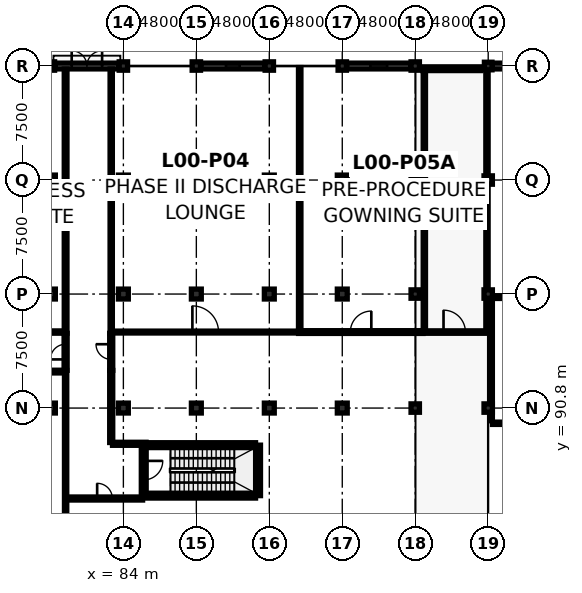
"""IFC4 building model, lengths in metres.
Left out: names, types, materials, properties, quantities, classifications, styles, units other than length and angle.
Written with IfcOpenShell. Run it as: python <this file> out.ifc"""

import sys

from ifc_helpers import new_model, si_unit, direction, frame, frame_2d, origin, origin_2d, place, context, subcontext, project, spatial, rectangle, extrude, element, fill, save


model = new_model("IFC4")
c1 = context("Model", 3, precision=1e-05, world=origin(), true_north=direction((0.0, 1.0)))
c2 = subcontext(c1, "Body", "Model", "MODEL_VIEW")
j1 = project(units=[si_unit("LENGTHUNIT", "METRE"), si_unit("PLANEANGLEUNIT", "RADIAN")], contexts=[c1])
p1 = place(None, origin())
s1 = spatial("IfcSite", under=j1, at=p1, CompositionType="ELEMENT")
p2 = place(p1, origin())
s2 = spatial("IfcBuilding", under=s1, at=p2, CompositionType="ELEMENT")
p3 = place(p2, origin())
s3 = spatial("IfcBuildingStorey", under=s2, at=p3, CompositionType="ELEMENT", Elevation=0.0)
for number, where, z_axis, x_axis in (
    (1, (79.2, 90.8, 0.0), (0.0, 0.0, 1.0), (1.0, 0.0, 0.0)),
    (2, (79.2, 98.3, 0.0), (0.0, 0.0, 1.0), (1.0, 0.0, 0.0)),
    (3, (79.2, 105.8, 0.0), (0.0, 0.0, 1.0), (1.0, 0.0, 0.0)),
):
    element("IfcColumn", number, at=place(p3, frame(where, z_axis=z_axis, x_axis=x_axis)), inside=s3, PredefinedType="COLUMN", context=c2, shape_type="SweptSolid", body=[
        extrude(rectangle(XDim=0.65, YDim=0.65, at=origin_2d()), origin(), (0.0, 0.0, 1.0), 4.7),
    ])
p4 = place(p3, frame((79.2, 113.3, 0.0), z_axis=(0.0, 0.0, 1.0), x_axis=(1.0, 0.0, 0.0)))
e4 = element("IfcColumn", 4, at=p4, inside=s3, PredefinedType="COLUMN", context=c2, shape_type="SweptSolid", body=[
    extrude(rectangle(XDim=0.55, YDim=0.55, at=origin_2d()), origin(), (0.0, 0.0, 1.0), 4.7),
])
for number, where, z_axis, x_axis in (
    (5, (84.0, 90.8, 0.0), (0.0, 0.0, 1.0), (1.0, 0.0, 0.0)),
    (6, (84.0, 98.3, 0.0), (0.0, 0.0, 1.0), (1.0, 0.0, 0.0)),
    (7, (84.0, 105.8, 0.0), (0.0, 0.0, 1.0), (1.0, 0.0, 0.0)),
):
    element("IfcColumn", number, at=place(p3, frame(where, z_axis=z_axis, x_axis=x_axis)), inside=s3, PredefinedType="COLUMN", context=c2, shape_type="SweptSolid", body=[
        extrude(rectangle(XDim=0.65, YDim=0.65, at=origin_2d()), origin(), (0.0, 0.0, 1.0), 4.7),
    ])
p5 = place(p3, frame((84.0, 113.3, 0.0), z_axis=(0.0, 0.0, 1.0), x_axis=(1.0, 0.0, 0.0)))
e8 = element("IfcColumn", 8, at=p5, inside=s3, PredefinedType="COLUMN", context=c2, shape_type="SweptSolid", body=[
    extrude(rectangle(XDim=0.55, YDim=0.55, at=origin_2d()), origin(), (0.0, 0.0, 1.0), 4.7),
])
for number, where, z_axis, x_axis in (
    (9, (88.8, 90.8, 0.0), (0.0, 0.0, 1.0), (1.0, 0.0, 0.0)),
    (10, (88.8, 98.3, 0.0), (0.0, 0.0, 1.0), (1.0, 0.0, 0.0)),
    (11, (88.8, 105.8, 0.0), (0.0, 0.0, 1.0), (1.0, 0.0, 0.0)),
):
    element("IfcColumn", number, at=place(p3, frame(where, z_axis=z_axis, x_axis=x_axis)), inside=s3, PredefinedType="COLUMN", context=c2, shape_type="SweptSolid", body=[
        extrude(rectangle(XDim=0.65, YDim=0.65, at=origin_2d()), origin(), (0.0, 0.0, 1.0), 4.7),
    ])
p6 = place(p3, frame((88.8, 113.3, 0.0), z_axis=(0.0, 0.0, 1.0), x_axis=(1.0, 0.0, 0.0)))
e12 = element("IfcColumn", 12, at=p6, inside=s3, PredefinedType="COLUMN", context=c2, shape_type="SweptSolid", body=[
    extrude(rectangle(XDim=0.55, YDim=0.55, at=origin_2d()), origin(), (0.0, 0.0, 1.0), 4.7),
])
for number, where, z_axis, x_axis in (
    (13, (93.6, 90.8, 0.0), (0.0, 0.0, 1.0), (1.0, 0.0, 0.0)),
    (14, (93.6, 98.3, 0.0), (0.0, 0.0, 1.0), (1.0, 0.0, 0.0)),
    (15, (93.6, 105.8, 0.0), (0.0, 0.0, 1.0), (1.0, 0.0, 0.0)),
):
    element("IfcColumn", number, at=place(p3, frame(where, z_axis=z_axis, x_axis=x_axis)), inside=s3, PredefinedType="COLUMN", context=c2, shape_type="SweptSolid", body=[
        extrude(rectangle(XDim=0.65, YDim=0.65, at=origin_2d()), origin(), (0.0, 0.0, 1.0), 4.7),
    ])
p7 = place(p3, frame((93.6, 113.3, 0.0), z_axis=(0.0, 0.0, 1.0), x_axis=(1.0, 0.0, 0.0)))
e16 = element("IfcColumn", 16, at=p7, inside=s3, PredefinedType="COLUMN", context=c2, shape_type="SweptSolid", body=[
    extrude(rectangle(XDim=0.55, YDim=0.55, at=origin_2d()), origin(), (0.0, 0.0, 1.0), 4.7),
])
for number, where, z_axis, x_axis in (
    (17, (98.4, 90.8, 0.0), (0.0, 0.0, 1.0), (1.0, 0.0, 0.0)),
    (18, (98.4, 98.3, 0.0), (0.0, 0.0, 1.0), (1.0, 0.0, 0.0)),
    (19, (98.4, 105.8, 0.0), (0.0, 0.0, 1.0), (1.0, 0.0, 0.0)),
):
    element("IfcColumn", number, at=place(p3, frame(where, z_axis=z_axis, x_axis=x_axis)), inside=s3, PredefinedType="COLUMN", context=c2, shape_type="SweptSolid", body=[
        extrude(rectangle(XDim=0.65, YDim=0.65, at=origin_2d()), origin(), (0.0, 0.0, 1.0), 4.7),
    ])
for number, where, z_axis, x_axis in (
    (20, (98.4, 113.3, 0.0), (0.0, 0.0, 1.0), (1.0, 0.0, 0.0)),
    (21, (103.2, 90.8, 0.0), (0.0, 0.0, 1.0), (1.0, 0.0, 0.0)),
    (22, (103.2, 98.3, 0.0), (0.0, 0.0, 1.0), (1.0, 0.0, 0.0)),
    (23, (103.2, 105.8, 0.0), (0.0, 0.0, 1.0), (1.0, 0.0, 0.0)),
    (24, (103.2, 113.3, 0.0), (0.0, 0.0, 1.0), (1.0, 0.0, 0.0)),
    (25, (108.0, 90.8, 0.0), (0.0, 0.0, 1.0), (1.0, 0.0, 0.0)),
    (26, (108.0, 98.3, 0.0), (0.0, 0.0, 1.0), (1.0, 0.0, 0.0)),
    (27, (108.0, 105.8, 0.0), (0.0, 0.0, 1.0), (1.0, 0.0, 0.0)),
):
    element("IfcColumn", number, at=place(p3, frame(where, z_axis=z_axis, x_axis=x_axis)), inside=s3, PredefinedType="COLUMN", context=c2, shape_type="SweptSolid", body=[
        extrude(rectangle(XDim=0.55, YDim=0.55, at=origin_2d()), origin(), (0.0, 0.0, 1.0), 4.7),
    ])
p8 = place(p3, frame((108.0, 113.3, 0.0), z_axis=(0.0, 0.0, 1.0), x_axis=(1.0, 0.0, 0.0)))
e28 = element("IfcColumn", 28, at=p8, inside=s3, PredefinedType="COLUMN", context=c2, shape_type="SweptSolid", body=[
    extrude(rectangle(XDim=0.5, YDim=0.5, at=origin_2d()), origin(), (0.0, 0.0, 1.0), 4.7),
])
p9 = place(p3, frame((79.475, 113.3, 0.0), z_axis=(0.0, 0.0, 1.0), x_axis=(1.0, 0.0, 0.0)))
e29 = element("IfcWall", 29, at=p9, inside=s3, PredefinedType="SOLIDWALL", context=c2, shape_type="SweptSolid", body=[
    extrude(rectangle(XDim=4.25, YDim=0.38, at=frame_2d((2.125, 0.0))), origin(), (0.0, 0.0, 1.0), 3.985),
])
p10 = place(p9, frame((1.125, 0.0, 0.0)))
e30 = element("IfcOpeningElement", 30, at=p10, cuts=e29, PredefinedType="OPENING", context=c2, shape_type="SweptSolid", body=[
    extrude(rectangle(XDim=2.0, YDim=2.35, at=frame_2d((1.0, 1.175))), frame((0.0, 0.202, 0.0), z_axis=(0.0, -1.0, 0.0), x_axis=(1.0, 0.0, 0.0)), (0.0, 0.0, 1.0), 0.404),
])
p11 = place(p3, frame((89.075, 113.3, 0.0), z_axis=(0.0, 0.0, 1.0), x_axis=(1.0, 0.0, 0.0)))
e31 = element("IfcWall", 31, at=p11, inside=s3, PredefinedType="SOLIDWALL", context=c2, shape_type="SweptSolid", body=[
    extrude(rectangle(XDim=4.25, YDim=0.38, at=frame_2d((2.125, 0.0))), origin(), (0.0, 0.0, 1.0), 3.985),
])
p12 = place(p11, frame((1.675, 0.0, 0.9)))
e32 = element("IfcOpeningElement", 32, at=p12, cuts=e31, PredefinedType="OPENING", context=c2, shape_type="SweptSolid", body=[
    extrude(rectangle(XDim=0.9, YDim=1.9, at=frame_2d((0.45, 0.95))), frame((0.0, 0.202, 0.0), z_axis=(0.0, -1.0, 0.0), x_axis=(1.0, 0.0, 0.0)), (0.0, 0.0, 1.0), 0.404),
])
p13 = place(p3, frame((98.675, 113.3, 0.0), z_axis=(0.0, 0.0, 1.0), x_axis=(1.0, 0.0, 0.0)))
e33 = element("IfcWall", 33, at=p13, inside=s3, PredefinedType="SOLIDWALL", context=c2, shape_type="SweptSolid", body=[
    extrude(rectangle(XDim=4.25, YDim=0.38, at=frame_2d((2.125, 0.0))), origin(), (0.0, 0.0, 1.0), 3.985),
])
p14 = place(p13, frame((1.575, 0.0, 0.9)))
e34 = element("IfcOpeningElement", 34, at=p14, cuts=e33, PredefinedType="OPENING", context=c2, shape_type="SweptSolid", body=[
    extrude(rectangle(XDim=1.1, YDim=1.3, at=frame_2d((0.55, 0.65))), frame((0.0, 0.202, 0.0), z_axis=(0.0, -1.0, 0.0), x_axis=(1.0, 0.0, 0.0)), (0.0, 0.0, 1.0), 0.404),
])
p15 = place(p3, frame((108.25, 113.3, 0.0), z_axis=(0.0, 0.0, 1.0), x_axis=(1.0, 0.0, 0.0)))
e35 = element("IfcWall", 35, at=p15, inside=s3, PredefinedType="SOLIDWALL", context=c2, shape_type="SweptSolid", body=[
    extrude(rectangle(XDim=7.5, YDim=0.38, at=frame_2d((3.75, 0.0))), origin(), (0.0, 0.0, 1.0), 3.985),
])
p16 = place(p3, frame((103.7, 113.12, 4.9), z_axis=(0.0, 0.0, 1.0), x_axis=(1.0, 0.0, 0.0)))
e36 = element("IfcWall", 36, at=p16, inside=s3, PredefinedType="PARAPET", context=c2, shape_type="SweptSolid", body=[
    extrude(rectangle(XDim=3.8, YDim=0.24, at=frame_2d((1.9, 0.0))), origin(), (0.0, 0.0, 1.0), 0.6),
])
p17 = place(p3, frame((85.505, 85.04, 0.0), z_axis=(0.0, 0.0, 1.0), x_axis=(1.0, 0.0, 0.0)))
e37 = element("IfcWall", 37, at=p17, inside=s3, PredefinedType="SHEAR", context=c2, shape_type="SweptSolid", body=[
    extrude(rectangle(XDim=7.19, YDim=0.32, at=frame_2d((3.595, 0.0))), origin(), (0.0, 0.0, 1.0), 4.7),
])
p18 = place(p3, frame((92.86, 85.04, 0.0), z_axis=(0.0, 0.0, 1.0), x_axis=(0.0, 1.0, 0.0)))
e38 = element("IfcWall", 38, at=p18, inside=s3, PredefinedType="SHEAR", context=c2, shape_type="SweptSolid", body=[
    extrude(rectangle(XDim=3.32, YDim=0.32, at=frame_2d((1.66, 0.0))), origin(), (0.0, 0.0, 1.0), 4.7),
])
p19 = place(p3, frame((92.695, 88.36, 0.0), z_axis=(0.0, 0.0, 1.0), x_axis=(-1.0, 0.0, 0.0)))
e39 = element("IfcWall", 39, at=p19, inside=s3, PredefinedType="SHEAR", context=c2, shape_type="SweptSolid", body=[
    extrude(rectangle(XDim=7.19, YDim=0.32, at=frame_2d((3.595, 0.0))), origin(), (0.0, 0.0, 1.0), 4.7),
])
p20 = place(p3, frame((85.34, 88.36, 0.0), z_axis=(0.0, 0.0, 1.0), x_axis=(0.0, -1.0, 0.0)))
e40 = element("IfcWall", 40, at=p20, inside=s3, PredefinedType="SHEAR", context=c2, shape_type="SweptSolid", body=[
    extrude(rectangle(XDim=3.32, YDim=0.32, at=frame_2d((1.66, 0.0))), origin(), (0.0, 0.0, 1.0), 4.7),
])
p21 = place(p20, frame((1.035, 0.0, 0.0)))
e41 = element("IfcOpeningElement", 41, at=p21, cuts=e40, PredefinedType="OPENING", context=c2, shape_type="SweptSolid", body=[
    extrude(rectangle(XDim=1.25, YDim=2.2, at=frame_2d((0.625, 1.1))), frame((0.0, 0.172, 0.0), z_axis=(0.0, -1.0, 0.0), x_axis=(1.0, 0.0, 0.0)), (0.0, 0.0, 1.0), 0.344),
])
p22 = place(p3, frame((70.527, 95.8, 0.0), z_axis=(0.0, 0.0, 1.0), x_axis=(1.0, 0.0, 0.0)))
e42 = element("IfcWall", 42, at=p22, inside=s3, PredefinedType="PARTITIONING", context=c2, shape_type="SweptSolid", body=[
    extrude(rectangle(XDim=9.588, YDim=0.15, at=frame_2d((4.794, 0.0))), origin(), (0.0, 0.0, 1.0), 3.985),
])
p23 = place(p22, frame((3.969, 0.0, 0.0)))
e43 = element("IfcOpeningElement", 43, at=p23, cuts=e42, PredefinedType="OPENING", context=c2, shape_type="SweptSolid", body=[
    extrude(rectangle(XDim=1.65, YDim=2.32, at=frame_2d((0.825, 1.16))), frame((0.0, 0.087, 0.0), z_axis=(0.0, -1.0, 0.0), x_axis=(1.0, 0.0, 0.0)), (0.0, 0.0, 1.0), 0.174),
])
p24 = place(p3, frame((83.285, 95.8, 0.0), z_axis=(0.0, 0.0, 1.0), x_axis=(1.0, 0.0, 0.0)))
e44 = element("IfcWall", 44, at=p24, inside=s3, PredefinedType="PARTITIONING", context=c2, shape_type="SweptSolid", body=[
    extrude(rectangle(XDim=12.23, YDim=0.125, at=frame_2d((6.115, 0.0))), origin(), (0.0, 0.0, 1.0), 3.985),
])
p25 = place(p24, frame((5.255, 0.0, 0.0)))
e45 = element("IfcOpeningElement", 45, at=p25, cuts=e44, PredefinedType="OPENING", context=c2, shape_type="SweptSolid", body=[
    extrude(rectangle(XDim=1.72, YDim=2.34, at=frame_2d((0.86, 1.17))), frame((0.0, 0.074, 0.0), z_axis=(0.0, -1.0, 0.0), x_axis=(1.0, 0.0, 0.0)), (0.0, 0.0, 1.0), 0.149),
])
p26 = place(p3, frame((95.527, 95.8, 0.0), z_axis=(0.0, 0.0, 1.0), x_axis=(1.0, 0.0, 0.0)))
e46 = element("IfcWall", 46, at=p26, inside=s3, PredefinedType="PARTITIONING", context=c2, shape_type="SweptSolid", body=[
    extrude(rectangle(XDim=8.188, YDim=0.18, at=frame_2d((4.094, 0.0))), origin(), (0.0, 0.0, 1.0), 3.985),
])
p27 = place(p26, frame((3.404, 0.0, 0.0)))
e47 = element("IfcOpeningElement", 47, at=p27, cuts=e46, PredefinedType="OPENING", context=c2, shape_type="SweptSolid", body=[
    extrude(rectangle(XDim=1.38, YDim=2.3, at=frame_2d((0.69, 1.15))), frame((0.0, 0.102, 0.0), z_axis=(0.0, -1.0, 0.0), x_axis=(1.0, 0.0, 0.0)), (0.0, 0.0, 1.0), 0.204),
])
p28 = place(p3, frame((103.727, 95.8, 0.0), z_axis=(0.0, 0.0, 1.0), x_axis=(1.0, 0.0, 0.0)))
e48 = element("IfcWall", 48, at=p28, inside=s3, PredefinedType="PARTITIONING", context=c2, shape_type="SweptSolid", body=[
    extrude(rectangle(XDim=4.108, YDim=0.16, at=frame_2d((2.054, 0.0))), origin(), (0.0, 0.0, 1.0), 4.035),
])
p29 = place(p28, frame((1.334, 0.0, 0.0)))
e49 = element("IfcOpeningElement", 49, at=p29, cuts=e48, PredefinedType="OPENING", context=c2, shape_type="SweptSolid", body=[
    extrude(rectangle(XDim=1.44, YDim=2.32, at=frame_2d((0.72, 1.16))), frame((0.0, 0.092, 0.0), z_axis=(0.0, -1.0, 0.0), x_axis=(1.0, 0.0, 0.0)), (0.0, 0.0, 1.0), 0.184),
])
p30 = place(p3, frame((74.027, 93.2, 0.0), z_axis=(0.0, 0.0, 1.0), x_axis=(1.0, 0.0, 0.0)))
e50 = element("IfcWall", 50, at=p30, inside=s3, PredefinedType="PARTITIONING", context=c2, shape_type="SweptSolid", body=[
    extrude(rectangle(XDim=6.088, YDim=0.18, at=frame_2d((3.044, 0.0))), origin(), (0.0, 0.0, 1.0), 3.985),
])
p31 = place(p30, frame((2.972, 0.0, 0.0)))
e51 = element("IfcOpeningElement", 51, at=p31, cuts=e50, PredefinedType="OPENING", context=c2, shape_type="SweptSolid", body=[
    extrude(rectangle(XDim=1.05, YDim=2.15, at=frame_2d((0.525, 1.075))), frame((0.0, 0.102, 0.0), z_axis=(0.0, -1.0, 0.0), x_axis=(1.0, 0.0, 0.0)), (0.0, 0.0, 1.0), 0.204),
])
p32 = place(p3, frame((80.2, 93.285, 0.0), z_axis=(0.0, 0.0, 1.0), x_axis=(0.0, 1.0, 0.0)))
e52 = element("IfcWall", 52, at=p32, inside=s3, PredefinedType="PARTITIONING", context=c2, shape_type="SweptSolid", body=[
    extrude(rectangle(XDim=2.43, YDim=0.2, at=frame_2d((1.215, 0.0))), origin(), (0.0, 0.0, 1.0), 4.7),
])
p33 = place(p32, frame((0.715, 0.0, 0.0)))
e53 = element("IfcOpeningElement", 53, at=p33, cuts=e52, PredefinedType="OPENING", context=c2, shape_type="SweptSolid", body=[
    extrude(rectangle(XDim=1.0, YDim=2.15, at=frame_2d((0.5, 1.075))), frame((0.0, 0.112, 0.0), z_axis=(0.0, -1.0, 0.0), x_axis=(1.0, 0.0, 0.0)), (0.0, 0.0, 1.0), 0.224),
])
p34 = place(p3, frame((83.2, 93.285, 0.0), z_axis=(0.0, 0.0, 1.0), x_axis=(0.0, 1.0, 0.0)))
e54 = element("IfcWall", 54, at=p34, inside=s3, PredefinedType="PARTITIONING", context=c2, shape_type="SweptSolid", body=[
    extrude(rectangle(XDim=2.43, YDim=0.2, at=frame_2d((1.215, 0.0))), origin(), (0.0, 0.0, 1.0), 4.7),
])
p35 = place(p34, frame((0.715, 0.0, 0.0)))
e55 = element("IfcOpeningElement", 55, at=p35, cuts=e54, PredefinedType="OPENING", context=c2, shape_type="SweptSolid", body=[
    extrude(rectangle(XDim=1.0, YDim=2.15, at=frame_2d((0.5, 1.075))), frame((0.0, 0.112, 0.0), z_axis=(0.0, -1.0, 0.0), x_axis=(1.0, 0.0, 0.0)), (0.0, 0.0, 1.0), 0.224),
])
p36 = place(p3, frame((80.285, 84.85, 0.0), z_axis=(0.0, 0.0, 1.0), x_axis=(1.0, 0.0, 0.0)))
e56 = element("IfcWall", 56, at=p36, inside=s3, PredefinedType="PARTITIONING", context=c2, shape_type="SweptSolid", body=[
    extrude(rectangle(XDim=4.98, YDim=0.2, at=frame_2d((2.49, 0.0))), origin(), (0.0, 0.0, 1.0), 3.985),
])
p37 = place(p36, frame((1.99, 0.0, 0.0)))
e57 = element("IfcOpeningElement", 57, at=p37, cuts=e56, PredefinedType="OPENING", context=c2, shape_type="SweptSolid", body=[
    extrude(rectangle(XDim=1.0, YDim=2.15, at=frame_2d((0.5, 1.075))), frame((0.0, 0.112, 0.0), z_axis=(0.0, -1.0, 0.0), x_axis=(1.0, 0.0, 0.0)), (0.0, 0.0, 1.0), 0.224),
])
p38 = place(p3, frame((108.285, 89.8, 0.0), z_axis=(0.0, 0.0, 1.0), x_axis=(1.0, 0.0, 0.0)))
e58 = element("IfcWall", 58, at=p38, inside=s3, PredefinedType="PARTITIONING", context=c2, shape_type="SweptSolid", body=[
    extrude(rectangle(XDim=9.63, YDim=0.15, at=frame_2d((4.815, 0.0))), origin(), (0.0, 0.0, 1.0), 3.985),
])
p39 = place(p38, frame((4.215, 0.0, 0.0)))
e59 = element("IfcOpeningElement", 59, at=p39, cuts=e58, PredefinedType="OPENING", context=c2, shape_type="SweptSolid", body=[
    extrude(rectangle(XDim=1.2, YDim=2.15, at=frame_2d((0.6, 1.075))), frame((0.0, 0.087, 0.0), z_axis=(0.0, -1.0, 0.0), x_axis=(1.0, 0.0, 0.0)), (0.0, 0.0, 1.0), 0.174),
])
p40 = place(p3, frame((108.287, 98.1, 0.0), z_axis=(0.0, 0.0, 1.0), x_axis=(1.0, 0.0, 0.0)))
e60 = element("IfcWall", 60, at=p40, inside=s3, PredefinedType="PARTITIONING", context=c2, shape_type="SweptSolid", body=[
    extrude(rectangle(XDim=9.628, YDim=0.18, at=frame_2d((4.814, 0.0))), origin(), (0.0, 0.0, 1.0), 3.885),
])
p41 = place(p3, frame((80.2, 95.727, 0.0), z_axis=(0.0, 0.0, 1.0), x_axis=(0.0, 1.0, 0.0)))
e61 = element("IfcWall", 61, at=p41, inside=s3, PredefinedType="PARTITIONING", context=c2, shape_type="SweptSolid", body=[
    extrude(rectangle(XDim=17.371, YDim=0.18, at=frame_2d((8.686, 0.0))), origin(), (0.0, 0.0, 1.0), 4.035),
])
p42 = place(p3, frame((83.2, 95.727, 0.0), z_axis=(0.0, 0.0, 1.0), x_axis=(0.0, 1.0, 0.0)))
e62 = element("IfcWall", 62, at=p42, inside=s3, PredefinedType="PARTITIONING", context=c2, shape_type="SweptSolid", body=[
    extrude(rectangle(XDim=17.371, YDim=0.15, at=frame_2d((8.686, 0.0))), origin(), (0.0, 0.0, 1.0), 4.035),
])
p43 = place(p3, frame((95.6, 95.902, 0.0), z_axis=(0.0, 0.0, 1.0), x_axis=(0.0, 1.0, 0.0)))
e63 = element("IfcWall", 63, at=p43, inside=s3, PredefinedType="PARTITIONING", context=c2, shape_type="SweptSolid", body=[
    extrude(rectangle(XDim=17.296, YDim=0.16, at=frame_2d((8.648, 0.0))), origin(), (0.0, 0.0, 1.0), 4.035),
])
p44 = place(p3, frame((103.8, 95.892, 0.0), z_axis=(0.0, 0.0, 1.0), x_axis=(0.0, 1.0, 0.0)))
e64 = element("IfcWall", 64, at=p44, inside=s3, PredefinedType="PARTITIONING", context=c2, shape_type="SweptSolid", body=[
    extrude(rectangle(XDim=17.096, YDim=0.15, at=frame_2d((8.548, 0.0))), origin(), (0.0, 0.0, 1.0), 4.7),
])
p45 = place(p3, frame((107.92, 95.965, 0.0), z_axis=(0.0, 0.0, 1.0), x_axis=(0.0, 1.0, 0.0)))
e65 = element("IfcWall", 65, at=p45, inside=s3, PredefinedType="PARTITIONING", context=c2, shape_type="SweptSolid", body=[
    extrude(rectangle(XDim=17.073, YDim=0.15, at=frame_2d((8.537, 0.0))), origin(), (0.0, 0.0, 1.0), 3.885),
])
p46 = place(p3, frame((80.2, 83.665, 0.0), z_axis=(0.0, 0.0, 1.0), x_axis=(0.0, 1.0, 0.0)))
e66 = element("IfcWall", 66, at=p46, inside=s3, PredefinedType="PARTITIONING", context=c2, shape_type="SweptSolid", body=[
    extrude(rectangle(XDim=9.608, YDim=0.15, at=frame_2d((4.804, 0.0))), origin(), (0.0, 0.0, 1.0), 4.035),
])
p47 = place(p3, frame((83.285, 88.45, 0.0), z_axis=(0.0, 0.0, 1.0), x_axis=(1.0, 0.0, 0.0)))
e67 = element("IfcWall", 67, at=p47, inside=s3, PredefinedType="PARTITIONING", context=c2, shape_type="SweptSolid", body=[
    extrude(rectangle(XDim=2.208, YDim=0.2, at=frame_2d((1.104, 0.0))), origin(), (0.0, 0.0, 1.0), 3.985),
])
p48 = place(p3, frame((83.2, 88.535, 0.0), z_axis=(0.0, 0.0, 1.0), x_axis=(0.0, 1.0, 0.0)))
e68 = element("IfcWall", 68, at=p48, inside=s3, PredefinedType="PARTITIONING", context=c2, shape_type="SweptSolid", body=[
    extrude(rectangle(XDim=4.738, YDim=0.2, at=frame_2d((2.369, 0.0))), origin(), (0.0, 0.0, 1.0), 4.085),
])
p49 = place(p3, frame((108.2, 89.965, 0.0), z_axis=(0.0, 0.0, 1.0), x_axis=(0.0, 1.0, 0.0)))
e69 = element("IfcWall", 69, at=p49, inside=s3, PredefinedType="PARTITIONING", context=c2, shape_type="SweptSolid", body=[
    extrude(rectangle(XDim=8.048, YDim=0.15, at=frame_2d((4.024, 0.0))), origin(), (0.0, 0.0, 1.0), 3.885),
])
p50 = place(p10, origin())
e70 = element("IfcDoor", 70, at=p50, inside=s3, OperationType="DOUBLE_DOOR_SINGLE_SWING", PredefinedType="DOOR", context=c2, shape_type="SweptSolid", body=[
    extrude(rectangle(XDim=2.0, YDim=2.35, at=frame_2d((1.0, 1.175))), frame((0.0, 0.025, 0.0), z_axis=(0.0, -1.0, 0.0), x_axis=(1.0, 0.0, 0.0)), (0.0, 0.0, 1.0), 0.05),
])
fill(e30, e70)
p51 = place(p12, origin())
e71 = element("IfcWindow", 71, at=p51, inside=s3, PartitioningType="SINGLE_PANEL", PredefinedType="WINDOW", context=c2, shape_type="SweptSolid", body=[
    extrude(rectangle(XDim=0.9, YDim=1.9, at=frame_2d((0.45, 0.95))), frame((0.0, 0.03, 0.0), z_axis=(0.0, -1.0, 0.0), x_axis=(1.0, 0.0, 0.0)), (0.0, 0.0, 1.0), 0.06),
])
fill(e32, e71)
p52 = place(p14, origin())
e72 = element("IfcWindow", 72, at=p52, inside=s3, PartitioningType="SINGLE_PANEL", PredefinedType="WINDOW", context=c2, shape_type="SweptSolid", body=[
    extrude(rectangle(XDim=1.1, YDim=1.3, at=frame_2d((0.55, 0.65))), frame((0.0, 0.03, 0.0), z_axis=(0.0, -1.0, 0.0), x_axis=(1.0, 0.0, 0.0)), (0.0, 0.0, 1.0), 0.06),
])
fill(e34, e72)
p53 = place(p21, origin())
e73 = element("IfcDoor", 73, at=p53, inside=s3, OperationType="SINGLE_SWING_LEFT", PredefinedType="DOOR", context=c2, shape_type="SweptSolid", body=[
    extrude(rectangle(XDim=1.25, YDim=2.2, at=frame_2d((0.625, 1.1))), frame((0.0, 0.025, 0.0), z_axis=(0.0, -1.0, 0.0), x_axis=(1.0, 0.0, 0.0)), (0.0, 0.0, 1.0), 0.05),
])
fill(e41, e73)
p54 = place(p25, origin())
e74 = element("IfcDoor", 74, at=p54, inside=s3, OperationType="SINGLE_SWING_LEFT", PredefinedType="DOOR", context=c2, shape_type="SweptSolid", body=[
    extrude(rectangle(XDim=1.72, YDim=2.34, at=frame_2d((0.86, 1.17))), frame((0.0, 0.025, 0.0), z_axis=(0.0, -1.0, 0.0), x_axis=(1.0, 0.0, 0.0)), (0.0, 0.0, 1.0), 0.05),
])
fill(e45, e74)
p55 = place(p27, origin())
e75 = element("IfcDoor", 75, at=p55, inside=s3, OperationType="SINGLE_SWING_RIGHT", PredefinedType="DOOR", context=c2, shape_type="SweptSolid", body=[
    extrude(rectangle(XDim=1.38, YDim=2.3, at=frame_2d((0.69, 1.15))), frame((0.0, 0.025, 0.0), z_axis=(0.0, -1.0, 0.0), x_axis=(1.0, 0.0, 0.0)), (0.0, 0.0, 1.0), 0.05),
])
fill(e47, e75)
p56 = place(p29, origin())
e76 = element("IfcDoor", 76, at=p56, inside=s3, OperationType="SINGLE_SWING_LEFT", PredefinedType="DOOR", context=c2, shape_type="SweptSolid", body=[
    extrude(rectangle(XDim=1.44, YDim=2.32, at=frame_2d((0.72, 1.16))), frame((0.0, 0.025, 0.0), z_axis=(0.0, -1.0, 0.0), x_axis=(1.0, 0.0, 0.0)), (0.0, 0.0, 1.0), 0.05),
])
fill(e49, e76)
p57 = place(p33, origin())
e77 = element("IfcDoor", 77, at=p57, inside=s3, OperationType="SINGLE_SWING_LEFT", PredefinedType="DOOR", context=c2, shape_type="SweptSolid", body=[
    extrude(rectangle(XDim=1.0, YDim=2.15, at=frame_2d((0.5, 1.075))), frame((0.0, 0.025, 0.0), z_axis=(0.0, -1.0, 0.0), x_axis=(1.0, 0.0, 0.0)), (0.0, 0.0, 1.0), 0.05),
])
fill(e53, e77)
p58 = place(p35, origin())
e78 = element("IfcDoor", 78, at=p58, inside=s3, OperationType="SINGLE_SWING_RIGHT", PredefinedType="DOOR", context=c2, shape_type="SweptSolid", body=[
    extrude(rectangle(XDim=1.0, YDim=2.15, at=frame_2d((0.5, 1.075))), frame((0.0, 0.025, 0.0), z_axis=(0.0, -1.0, 0.0), x_axis=(1.0, 0.0, 0.0)), (0.0, 0.0, 1.0), 0.05),
])
fill(e55, e78)
p59 = place(p37, origin())
e79 = element("IfcDoor", 79, at=p59, inside=s3, OperationType="SINGLE_SWING_LEFT", PredefinedType="DOOR", context=c2, shape_type="SweptSolid", body=[
    extrude(rectangle(XDim=1.0, YDim=2.15, at=frame_2d((0.5, 1.075))), frame((0.0, 0.025, 0.0), z_axis=(0.0, -1.0, 0.0), x_axis=(1.0, 0.0, 0.0)), (0.0, 0.0, 1.0), 0.05),
])
fill(e57, e79)
save(model, sys.argv[1])
